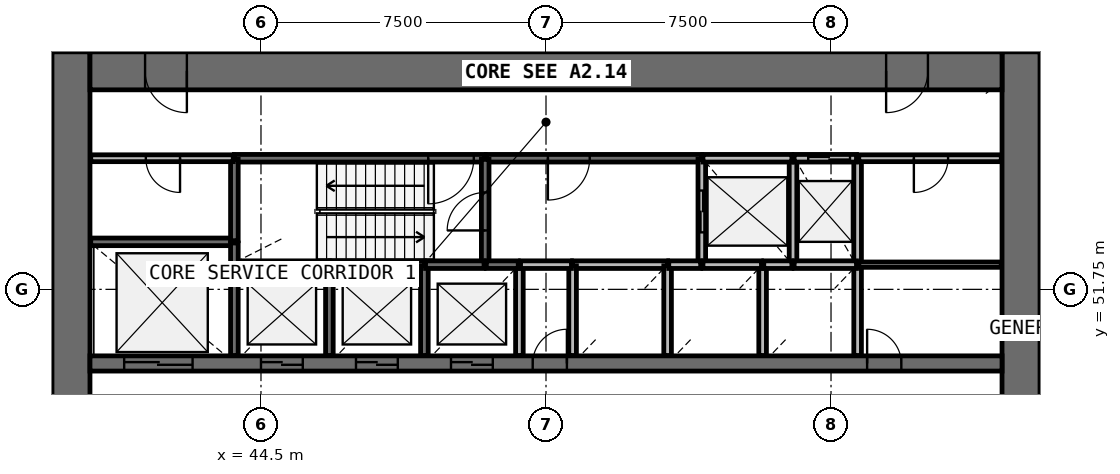
"""IFC4 building model, lengths in metres.
Left out: names, types, materials, properties, quantities, classifications, styles, units other than length and angle.
Written with IfcOpenShell. Run it as: python <this file> out.ifc"""

import sys

from ifc_helpers import new_model, si_unit, direction, frame, frame_2d, origin, place, context, subcontext, project, spatial, rectangle, extrude, source, transform, mapped, element, fill, save


model = new_model("IFC4")
c1 = context("Model", 3, precision=1e-05, world=origin(), true_north=direction((0.0, 1.0)))
c2 = subcontext(c1, "Body", "Model", "MODEL_VIEW")
j1 = project(units=[si_unit("LENGTHUNIT", "METRE"), si_unit("PLANEANGLEUNIT", "RADIAN")], contexts=[c1])
p1 = place(None, origin())
s1 = spatial("IfcSite", under=j1, at=p1, CompositionType="ELEMENT")
p2 = place(p1, origin())
s2 = spatial("IfcBuilding", under=s1, at=p2, CompositionType="ELEMENT")
p3 = place(p2, frame((0.0, 0.0, 57.8)))
s3 = spatial("IfcBuildingStorey", under=s2, at=p3, CompositionType="ELEMENT", Elevation=57.8)
p4 = place(p3, frame((64.5, 38.0, 0.0), z_axis=(0.0, 0.0, 1.0), x_axis=(0.0, 1.0, 0.0)))
e1 = element("IfcWall", 1, at=p4, inside=s3, PredefinedType="SHEAR", context=c2, shape_type="SweptSolid", body=[
    extrude(rectangle(XDim=20.0, YDim=1.0, at=frame_2d((10.0, 0.0))), origin(), (0.0, 0.0, 1.0), 4.4),
])
p5 = place(p4, frame((9.1, 0.0, 0.0)))
e2 = element("IfcOpeningElement", 2, at=p5, cuts=e1, PredefinedType="OPENING", context=c2, shape_type="SweptSolid", body=[
    extrude(rectangle(XDim=1.8, YDim=2.1, at=frame_2d((0.9, 1.05))), frame((0.0, 0.51, 0.0), z_axis=(0.0, -1.0, 0.0), x_axis=(1.0, 0.0, 0.0)), (0.0, 0.0, 1.0), 1.02),
])
p6 = place(p3, frame((39.5, 58.0, 0.0), z_axis=(0.0, 0.0, 1.0), x_axis=(0.0, -1.0, 0.0)))
e3 = element("IfcWall", 3, at=p6, inside=s3, PredefinedType="SHEAR", context=c2, shape_type="SweptSolid", body=[
    extrude(rectangle(XDim=20.0, YDim=1.0, at=frame_2d((10.0, 0.0))), origin(), (0.0, 0.0, 1.0), 4.4),
])
p7 = place(p6, frame((9.1, 0.0, 0.0)))
e4 = element("IfcOpeningElement", 4, at=p7, cuts=e3, PredefinedType="OPENING", context=c2, shape_type="SweptSolid", body=[
    extrude(rectangle(XDim=1.8, YDim=2.1, at=frame_2d((0.9, 1.05))), frame((0.0, 0.51, 0.0), z_axis=(0.0, -1.0, 0.0), x_axis=(1.0, 0.0, 0.0)), (0.0, 0.0, 1.0), 1.02),
])
p8 = place(p3, frame((64.0, 57.5, 0.0), z_axis=(0.0, 0.0, 1.0), x_axis=(-1.0, 0.0, 0.0)))
e5 = element("IfcWall", 5, at=p8, inside=s3, PredefinedType="SHEAR", context=c2, shape_type="SweptSolid", body=[
    extrude(rectangle(XDim=24.0, YDim=1.0, at=frame_2d((12.0, 0.0))), origin(), (0.0, 0.0, 1.0), 4.4),
])
p9 = place(p8, frame((21.45, 0.0, 0.0)))
e6 = element("IfcOpeningElement", 6, at=p9, cuts=e5, PredefinedType="OPENING", context=c2, shape_type="SweptSolid", body=[
    extrude(rectangle(XDim=1.1, YDim=2.1, at=frame_2d((0.55, 1.05))), frame((0.0, 0.51, 0.0), z_axis=(0.0, -1.0, 0.0), x_axis=(1.0, 0.0, 0.0)), (0.0, 0.0, 1.0), 1.02),
])
p10 = place(p8, frame((1.95, 0.0, 0.0)))
e7 = element("IfcOpeningElement", 7, at=p10, cuts=e5, PredefinedType="OPENING", context=c2, shape_type="SweptSolid", body=[
    extrude(rectangle(XDim=1.1, YDim=2.1, at=frame_2d((0.55, 1.05))), frame((0.0, 0.51, 0.0), z_axis=(0.0, -1.0, 0.0), x_axis=(1.0, 0.0, 0.0)), (0.0, 0.0, 1.0), 1.02),
])
p11 = place(p3, frame((40.0, 49.8, 0.0), z_axis=(0.0, 0.0, 1.0), x_axis=(1.0, 0.0, 0.0)))
e8 = element("IfcWall", 8, at=p11, inside=s3, PredefinedType="SHEAR", context=c2, shape_type="SweptSolid", body=[
    extrude(rectangle(XDim=24.0, YDim=0.4, at=frame_2d((12.0, 0.0))), origin(), (0.0, 0.0, 1.0), 4.4),
])
p12 = place(p11, frame((4.5, 0.0, 0.0)))
e9 = element("IfcOpeningElement", 9, at=p12, cuts=e8, PredefinedType="OPENING", context=c2, shape_type="SweptSolid", body=[
    extrude(rectangle(XDim=1.1, YDim=2.1, at=frame_2d((0.55, 1.05))), frame((0.0, 0.21, 0.0), z_axis=(0.0, -1.0, 0.0), x_axis=(1.0, 0.0, 0.0)), (0.0, 0.0, 1.0), 0.42),
])
p13 = place(p11, frame((7.0, 0.0, 0.0)))
e10 = element("IfcOpeningElement", 10, at=p13, cuts=e8, PredefinedType="OPENING", context=c2, shape_type="SweptSolid", body=[
    extrude(rectangle(XDim=1.1, YDim=2.1, at=frame_2d((0.55, 1.05))), frame((0.0, 0.21, 0.0), z_axis=(0.0, -1.0, 0.0), x_axis=(1.0, 0.0, 0.0)), (0.0, 0.0, 1.0), 0.42),
])
p14 = place(p11, frame((9.5, 0.0, 0.0)))
e11 = element("IfcOpeningElement", 11, at=p14, cuts=e8, PredefinedType="OPENING", context=c2, shape_type="SweptSolid", body=[
    extrude(rectangle(XDim=1.1, YDim=2.1, at=frame_2d((0.55, 1.05))), frame((0.0, 0.21, 0.0), z_axis=(0.0, -1.0, 0.0), x_axis=(1.0, 0.0, 0.0)), (0.0, 0.0, 1.0), 0.42),
])
p15 = place(p11, frame((0.9, 0.0, 0.0)))
e12 = element("IfcOpeningElement", 12, at=p15, cuts=e8, PredefinedType="OPENING", context=c2, shape_type="SweptSolid", body=[
    extrude(rectangle(XDim=1.8, YDim=2.4, at=frame_2d((0.9, 1.2))), frame((0.0, 0.21, 0.0), z_axis=(0.0, -1.0, 0.0), x_axis=(1.0, 0.0, 0.0)), (0.0, 0.0, 1.0), 0.42),
])
p16 = place(p11, frame((20.45, 0.0, 0.0)))
e13 = element("IfcOpeningElement", 13, at=p16, cuts=e8, PredefinedType="OPENING", context=c2, shape_type="SweptSolid", body=[
    extrude(rectangle(XDim=0.9, YDim=2.1, at=frame_2d((0.45, 1.05))), frame((0.0, 0.21, 0.0), z_axis=(0.0, -1.0, 0.0), x_axis=(1.0, 0.0, 0.0)), (0.0, 0.0, 1.0), 0.42),
])
p17 = place(p11, frame((11.65, 0.0, 0.0)))
e14 = element("IfcOpeningElement", 14, at=p17, cuts=e8, PredefinedType="OPENING", context=c2, shape_type="SweptSolid", body=[
    extrude(rectangle(XDim=0.9, YDim=2.1, at=frame_2d((0.45, 1.05))), frame((0.0, 0.21, 0.0), z_axis=(0.0, -1.0, 0.0), x_axis=(1.0, 0.0, 0.0)), (0.0, 0.0, 1.0), 0.42),
])
p18 = place(p3, frame((50.4, 55.2, 0.0), z_axis=(0.0, 0.0, 1.0), x_axis=(-1.0, 0.0, 0.0)))
e15 = element("IfcWall", 15, at=p18, inside=s3, PredefinedType="SOLIDWALL", context=c2, shape_type="SweptSolid", body=[
    extrude(rectangle(XDim=6.6, YDim=0.2, at=frame_2d((3.3, 0.0))), origin(), (0.0, 0.0, 1.0), 3.95),
])
p19 = place(p18, frame((0.3, 0.0, 0.0)))
e16 = element("IfcOpeningElement", 16, at=p19, cuts=e15, PredefinedType="OPENING", context=c2, shape_type="SweptSolid", body=[
    extrude(rectangle(XDim=1.2, YDim=2.1, at=frame_2d((0.6, 1.05))), frame((0.0, 0.11, 0.0), z_axis=(0.0, -1.0, 0.0), x_axis=(1.0, 0.0, 0.0)), (0.0, 0.0, 1.0), 0.22),
])
p20 = place(p3, frame((56.1, 55.2, 0.0), z_axis=(0.0, 0.0, 1.0), x_axis=(-1.0, 0.0, 0.0)))
e17 = element("IfcWall", 17, at=p20, inside=s3, PredefinedType="SOLIDWALL", context=c2, shape_type="SweptSolid", body=[
    extrude(rectangle(XDim=5.67, YDim=0.2, at=frame_2d((2.835, 0.0))), origin(), (0.0, 0.0, 1.0), 3.95),
])
p21 = place(p20, frame((2.95, 0.0, 0.0)))
e18 = element("IfcOpeningElement", 18, at=p21, cuts=e17, PredefinedType="OPENING", context=c2, shape_type="SweptSolid", body=[
    extrude(rectangle(XDim=1.1, YDim=2.1, at=frame_2d((0.55, 1.05))), frame((0.0, 0.11, 0.0), z_axis=(0.0, -1.0, 0.0), x_axis=(1.0, 0.0, 0.0)), (0.0, 0.0, 1.0), 0.22),
])
p22 = place(p3, frame((43.8, 53.0, 0.0), z_axis=(0.0, 0.0, 1.0), x_axis=(-1.0, 0.0, 0.0)))
e19 = element("IfcWall", 19, at=p22, inside=s3, PredefinedType="SOLIDWALL", context=c2, shape_type="SweptSolid", body=[
    extrude(rectangle(XDim=3.78, YDim=0.2, at=frame_2d((1.89, 0.0))), origin(), (0.0, 0.0, 1.0), 3.95),
])
p23 = place(p3, frame((50.4, 52.4, 0.0), z_axis=(0.0, 0.0, 1.0), x_axis=(0.0, 1.0, 0.0)))
e20 = element("IfcWall", 20, at=p23, inside=s3, PredefinedType="SOLIDWALL", context=c2, shape_type="SweptSolid", body=[
    extrude(rectangle(XDim=2.77, YDim=0.2, at=frame_2d((1.385, 0.0))), origin(), (0.0, 0.0, 1.0), 3.95),
])
p24 = place(p23, frame((0.9, 0.0, 0.0)))
e21 = element("IfcOpeningElement", 21, at=p24, cuts=e20, PredefinedType="OPENING", context=c2, shape_type="SweptSolid", body=[
    extrude(rectangle(XDim=1.0, YDim=2.1, at=frame_2d((0.5, 1.05))), frame((0.0, 0.11, 0.0), z_axis=(0.0, -1.0, 0.0), x_axis=(1.0, 0.0, 0.0)), (0.0, 0.0, 1.0), 0.22),
])
p25 = place(p3, frame((56.1, 55.17, 0.0), z_axis=(0.0, 0.0, 1.0), x_axis=(0.0, -1.0, 0.0)))
e22 = element("IfcWall", 22, at=p25, inside=s3, PredefinedType="SOLIDWALL", context=c2, shape_type="SweptSolid", body=[
    extrude(rectangle(XDim=2.77, YDim=0.2, at=frame_2d((1.385, 0.0))), origin(), (0.0, 0.0, 1.0), 3.95),
])
p26 = place(p25, frame((0.82, 0.0, 0.0)))
e23 = element("IfcOpeningElement", 23, at=p26, cuts=e22, PredefinedType="OPENING", context=c2, shape_type="SweptSolid", body=[
    extrude(rectangle(XDim=1.1, YDim=2.1, at=frame_2d((0.55, 1.05))), frame((0.0, 0.11, 0.0), z_axis=(0.0, -1.0, 0.0), x_axis=(1.0, 0.0, 0.0)), (0.0, 0.0, 1.0), 0.22),
])
for number, where, z_axis, x_axis in (
    (24, (58.5, 52.4, 0.0), (0.0, 0.0, 1.0), (0.0, 1.0, 0.0)),
    (25, (60.2, 52.4, 0.0), (0.0, 0.0, 1.0), (0.0, 1.0, 0.0)),
):
    element("IfcWall", number, at=place(p3, frame(where, z_axis=z_axis, x_axis=x_axis)), inside=s3, PredefinedType="SOLIDWALL", context=c2, shape_type="SweptSolid", body=[
        extrude(rectangle(XDim=2.8, YDim=0.2, at=frame_2d((1.4, 0.0))), origin(), (0.0, 0.0, 1.0), 3.95),
    ])
p27 = place(p3, frame((46.3, 52.4, 0.0), z_axis=(0.0, 0.0, 1.0), x_axis=(-1.0, 0.0, 0.0)))
e26 = element("IfcWall", 26, at=p27, inside=s3, PredefinedType="SOLIDWALL", context=c2, shape_type="SweptSolid", body=[
    extrude(rectangle(XDim=2.5, YDim=0.2, at=frame_2d((1.25, 0.0))), origin(), (0.0, 0.0, 1.0), 3.95),
])
p28 = place(p3, frame((48.8, 52.4, 0.0), z_axis=(0.0, 0.0, 1.0), x_axis=(-1.0, 0.0, 0.0)))
e27 = element("IfcWall", 27, at=p28, inside=s3, PredefinedType="SOLIDWALL", context=c2, shape_type="SweptSolid", body=[
    extrude(rectangle(XDim=2.47, YDim=0.2, at=frame_2d((1.235, 0.0))), origin(), (0.0, 0.0, 1.0), 3.95),
])
p29 = place(p3, frame((55.2, 52.4, 0.0), z_axis=(0.0, 0.0, 1.0), x_axis=(-1.0, 0.0, 0.0)))
e28 = element("IfcWall", 28, at=p29, inside=s3, PredefinedType="SOLIDWALL", context=c2, shape_type="SweptSolid", body=[
    extrude(rectangle(XDim=2.5, YDim=0.2, at=frame_2d((1.25, 0.0))), origin(), (0.0, 0.0, 1.0), 3.95),
])
p30 = place(p3, frame((58.47, 55.2, 0.0), z_axis=(0.0, 0.0, 1.0), x_axis=(-1.0, 0.0, 0.0)))
e29 = element("IfcWall", 29, at=p30, inside=s3, PredefinedType="SOLIDWALL", context=c2, shape_type="SweptSolid", body=[
    extrude(rectangle(XDim=2.34, YDim=0.2, at=frame_2d((1.17, 0.0))), origin(), (0.0, 0.0, 1.0), 3.95),
])
for number, where, z_axis, x_axis in (
    (30, (43.8, 52.37, 0.0), (0.0, 0.0, 1.0), (0.0, -1.0, 0.0)),
    (31, (46.3, 50.01, 0.0), (0.0, 0.0, 1.0), (0.0, 1.0, 0.0)),
    (32, (48.8, 50.01, 0.0), (0.0, 0.0, 1.0), (0.0, 1.0, 0.0)),
):
    element("IfcWall", number, at=place(p3, frame(where, z_axis=z_axis, x_axis=x_axis)), inside=s3, PredefinedType="SOLIDWALL", context=c2, shape_type="SweptSolid", body=[
        extrude(rectangle(XDim=2.36, YDim=0.2, at=frame_2d((1.18, 0.0))), origin(), (0.0, 0.0, 1.0), 3.95),
    ])
p31 = place(p3, frame((51.3, 50.01, 0.0), z_axis=(0.0, 0.0, 1.0), x_axis=(0.0, 1.0, 0.0)))
e33 = element("IfcWall", 33, at=p31, inside=s3, PredefinedType="SOLIDWALL", context=c2, shape_type="SweptSolid", body=[
    extrude(rectangle(XDim=2.39, YDim=0.2, at=frame_2d((1.195, 0.0))), origin(), (0.0, 0.0, 1.0), 3.95),
])
for number, where, z_axis, x_axis in (
    (34, (52.7, 52.37, 0.0), (0.0, 0.0, 1.0), (0.0, -1.0, 0.0)),
    (35, (55.2, 50.01, 0.0), (0.0, 0.0, 1.0), (0.0, 1.0, 0.0)),
):
    element("IfcWall", number, at=place(p3, frame(where, z_axis=z_axis, x_axis=x_axis)), inside=s3, PredefinedType="SOLIDWALL", context=c2, shape_type="SweptSolid", body=[
        extrude(rectangle(XDim=2.36, YDim=0.2, at=frame_2d((1.18, 0.0))), origin(), (0.0, 0.0, 1.0), 3.95),
    ])
p32 = place(p3, frame((57.7, 50.01, 0.0), z_axis=(0.0, 0.0, 1.0), x_axis=(0.0, 1.0, 0.0)))
e36 = element("IfcWall", 36, at=p32, inside=s3, PredefinedType="SOLIDWALL", context=c2, shape_type="SweptSolid", body=[
    extrude(rectangle(XDim=2.39, YDim=0.2, at=frame_2d((1.195, 0.0))), origin(), (0.0, 0.0, 1.0), 3.95),
])
p33 = place(p3, frame((60.2, 50.01, 0.0), z_axis=(0.0, 0.0, 1.0), x_axis=(0.0, 1.0, 0.0)))
e37 = element("IfcWall", 37, at=p33, inside=s3, PredefinedType="SOLIDWALL", context=c2, shape_type="SweptSolid", body=[
    extrude(rectangle(XDim=2.36, YDim=0.2, at=frame_2d((1.18, 0.0))), origin(), (0.0, 0.0, 1.0), 3.95),
])
p34 = place(p3, frame((43.8, 55.17, 0.0), z_axis=(0.0, 0.0, 1.0), x_axis=(0.0, -1.0, 0.0)))
e38 = element("IfcWall", 38, at=p34, inside=s3, PredefinedType="SOLIDWALL", context=c2, shape_type="SweptSolid", body=[
    extrude(rectangle(XDim=2.14, YDim=0.2, at=frame_2d((1.07, 0.0))), origin(), (0.0, 0.0, 1.0), 3.95),
])
p35 = place(p3, frame((60.17, 52.4, 0.0), z_axis=(0.0, 0.0, 1.0), x_axis=(-1.0, 0.0, 0.0)))
e39 = element("IfcWall", 39, at=p35, inside=s3, PredefinedType="SOLIDWALL", context=c2, shape_type="SweptSolid", body=[
    extrude(rectangle(XDim=1.64, YDim=0.2, at=frame_2d((0.82, 0.0))), origin(), (0.0, 0.0, 1.0), 3.95),
])
p36 = place(p3, frame((60.17, 55.2, 0.0), z_axis=(0.0, 0.0, 1.0), x_axis=(-1.0, 0.0, 0.0)))
e40 = element("IfcWall", 40, at=p36, inside=s3, PredefinedType="SOLIDWALL", context=c2, shape_type="SweptSolid", body=[
    extrude(rectangle(XDim=1.64, YDim=0.2, at=frame_2d((0.82, 0.0))), origin(), (0.0, 0.0, 1.0), 3.95),
])
p37 = place(p36, frame((0.17, 0.0, 0.0)))
e41 = element("IfcOpeningElement", 41, at=p37, cuts=e40, PredefinedType="OPENING", context=c2, shape_type="SweptSolid", body=[
    extrude(rectangle(XDim=1.1, YDim=2.1, at=frame_2d((0.55, 1.05))), frame((0.0, 0.11, 0.0), z_axis=(0.0, -1.0, 0.0), x_axis=(1.0, 0.0, 0.0)), (0.0, 0.0, 1.0), 0.22),
])
for number, where, z_axis, x_axis in (
    (42, (50.37, 52.4, 0.0), (0.0, 0.0, 1.0), (-1.0, 0.0, 0.0)),
    (43, (57.67, 52.4, 0.0), (0.0, 0.0, 1.0), (-1.0, 0.0, 0.0)),
):
    element("IfcWall", number, at=place(p3, frame(where, z_axis=z_axis, x_axis=x_axis)), inside=s3, PredefinedType="SOLIDWALL", context=c2, shape_type="SweptSolid", body=[
        extrude(rectangle(XDim=1.54, YDim=0.2, at=frame_2d((0.77, 0.0))), origin(), (0.0, 0.0, 1.0), 3.95),
    ])
p38 = place(p3, frame((51.33, 52.4, 0.0), z_axis=(0.0, 0.0, 1.0), x_axis=(1.0, 0.0, 0.0)))
e44 = element("IfcWall", 44, at=p38, inside=s3, PredefinedType="SOLIDWALL", context=c2, shape_type="SweptSolid", body=[
    extrude(rectangle(XDim=1.34, YDim=0.2, at=frame_2d((0.67, 0.0))), origin(), (0.0, 0.0, 1.0), 3.95),
])
for number, where, z_axis, x_axis in (
    (45, (51.27, 52.4, 0.0), (0.0, 0.0, 1.0), (-1.0, 0.0, 0.0)),
    (46, (56.07, 52.4, 0.0), (0.0, 0.0, 1.0), (-1.0, 0.0, 0.0)),
):
    element("IfcWall", number, at=place(p3, frame(where, z_axis=z_axis, x_axis=x_axis)), inside=s3, PredefinedType="SOLIDWALL", context=c2, shape_type="SweptSolid", body=[
        extrude(rectangle(XDim=0.84, YDim=0.2, at=frame_2d((0.42, 0.0))), origin(), (0.0, 0.0, 1.0), 3.95),
    ])
p39 = place(p3, frame((58.47, 52.4, 0.0), z_axis=(0.0, 0.0, 1.0), x_axis=(-1.0, 0.0, 0.0)))
e47 = element("IfcWall", 47, at=p39, inside=s3, PredefinedType="SOLIDWALL", context=c2, shape_type="SweptSolid", body=[
    extrude(rectangle(XDim=0.74, YDim=0.2, at=frame_2d((0.37, 0.0))), origin(), (0.0, 0.0, 1.0), 3.95),
])
p40 = place(p3, frame((43.8, 52.43, 0.0), z_axis=(0.0, 0.0, 1.0), x_axis=(0.0, 1.0, 0.0)))
e48 = element("IfcWall", 48, at=p40, inside=s3, PredefinedType="SOLIDWALL", context=c2, shape_type="SweptSolid", body=[
    extrude(rectangle(XDim=0.54, YDim=0.2, at=frame_2d((0.27, 0.0))), origin(), (0.0, 0.0, 1.0), 3.95),
])
p41 = place(p3, frame((43.77, 55.2, 0.0), z_axis=(0.0, 0.0, 1.0), x_axis=(-1.0, 0.0, 0.0)))
e49 = element("IfcWall", 49, at=p41, inside=s3, PredefinedType="PARTITIONING", context=c2, shape_type="SweptSolid", body=[
    extrude(rectangle(XDim=3.75, YDim=0.18, at=frame_2d((1.875, 0.0))), origin(), (0.0, 0.0, 1.0), 3.95),
])
p42 = place(p41, frame((1.4, 0.0, 0.0)))
e50 = element("IfcOpeningElement", 50, at=p42, cuts=e49, PredefinedType="OPENING", context=c2, shape_type="SweptSolid", body=[
    extrude(rectangle(XDim=0.9, YDim=2.1, at=frame_2d((0.45, 1.05))), frame((0.0, 0.1, 0.0), z_axis=(0.0, -1.0, 0.0), x_axis=(1.0, 0.0, 0.0)), (0.0, 0.0, 1.0), 0.2),
])
p43 = place(p3, frame((63.98, 55.2, 0.0), z_axis=(0.0, 0.0, 1.0), x_axis=(-1.0, 0.0, 0.0)))
e51 = element("IfcWall", 51, at=p43, inside=s3, PredefinedType="PARTITIONING", context=c2, shape_type="SweptSolid", body=[
    extrude(rectangle(XDim=3.75, YDim=0.18, at=frame_2d((1.875, 0.0))), origin(), (0.0, 0.0, 1.0), 3.95),
])
p44 = place(p43, frame((1.4, 0.0, 0.0)))
e52 = element("IfcOpeningElement", 52, at=p44, cuts=e51, PredefinedType="OPENING", context=c2, shape_type="SweptSolid", body=[
    extrude(rectangle(XDim=0.9, YDim=2.1, at=frame_2d((0.45, 1.05))), frame((0.0, 0.1, 0.0), z_axis=(0.0, -1.0, 0.0), x_axis=(1.0, 0.0, 0.0)), (0.0, 0.0, 1.0), 0.2),
])
p45 = place(p3, frame((63.98, 52.4, 0.0), z_axis=(0.0, 0.0, 1.0), x_axis=(-1.0, 0.0, 0.0)))
e53 = element("IfcWall", 53, at=p45, inside=s3, PredefinedType="PARTITIONING", context=c2, shape_type="SweptSolid", body=[
    extrude(rectangle(XDim=3.75, YDim=0.14, at=frame_2d((1.875, 0.0))), origin(), (0.0, 0.0, 1.0), 3.05),
])
m1 = source(origin(), c2, "Body", "SweptSolid", [
    extrude(rectangle(XDim=1.1, YDim=2.1, at=frame_2d((0.55, 1.05))), frame((0.0, 0.025, 0.0), z_axis=(0.0, -1.0, 0.0), x_axis=(1.0, 0.0, 0.0)), (0.0, 0.0, 1.0), 0.05),
])
p46 = place(p12, origin())
e54 = element("IfcDoor", 54, at=p46, inside=s3, OperationType="DOUBLE_DOOR_SLIDING", PredefinedType="USERDEFINED", context=c2, shape_type="MappedRepresentation", body=[
    mapped(m1, transform((0.0, 0.0, 0.0), scale=1.0)),
])
fill(e9, e54)
p47 = place(p13, origin())
e55 = element("IfcDoor", 55, at=p47, inside=s3, OperationType="DOUBLE_DOOR_SLIDING", PredefinedType="USERDEFINED", context=c2, shape_type="MappedRepresentation", body=[
    mapped(m1, transform((0.0, 0.0, 0.0), scale=1.0)),
])
fill(e10, e55)
p48 = place(p14, origin())
e56 = element("IfcDoor", 56, at=p48, inside=s3, OperationType="DOUBLE_DOOR_SLIDING", PredefinedType="USERDEFINED", context=c2, shape_type="MappedRepresentation", body=[
    mapped(m1, transform((0.0, 0.0, 0.0), scale=1.0)),
])
fill(e11, e56)
p49 = place(p26, origin())
e57 = element("IfcDoor", 57, at=p49, inside=s3, OperationType="DOUBLE_DOOR_SLIDING", PredefinedType="USERDEFINED", context=c2, shape_type="MappedRepresentation", body=[
    mapped(m1, transform((0.0, 0.0, 0.0), scale=1.0)),
])
fill(e23, e57)
p50 = place(p37, origin())
e58 = element("IfcDoor", 58, at=p50, inside=s3, OperationType="DOUBLE_DOOR_SLIDING", PredefinedType="USERDEFINED", context=c2, shape_type="MappedRepresentation", body=[
    mapped(m1, transform((0.0, 0.0, 0.0), scale=1.0)),
])
fill(e41, e58)
m2 = source(origin(), c2, "Body", "SweptSolid", [
    extrude(rectangle(XDim=1.8, YDim=2.4, at=frame_2d((0.9, 1.2))), frame((0.0, 0.025, 0.0), z_axis=(0.0, -1.0, 0.0), x_axis=(1.0, 0.0, 0.0)), (0.0, 0.0, 1.0), 0.05),
])
p51 = place(p15, origin())
e59 = element("IfcDoor", 59, at=p51, inside=s3, OperationType="DOUBLE_DOOR_SLIDING", PredefinedType="USERDEFINED", context=c2, shape_type="MappedRepresentation", body=[
    mapped(m2, transform((0.0, 0.0, 0.0), scale=1.0)),
])
fill(e12, e59)
m3 = source(origin(), c2, "Body", "SweptSolid", [
    extrude(rectangle(XDim=1.2, YDim=2.1, at=frame_2d((0.6, 1.05))), frame((0.0, 0.025, 0.0), z_axis=(0.0, -1.0, 0.0), x_axis=(1.0, 0.0, 0.0)), (0.0, 0.0, 1.0), 0.05),
])
p52 = place(p19, origin())
e60 = element("IfcDoor", 60, at=p52, inside=s3, OperationType="SINGLE_SWING_RIGHT", PredefinedType="DOOR", context=c2, shape_type="MappedRepresentation", body=[
    mapped(m3, transform((0.0, 0.0, 0.0), scale=1.0)),
])
fill(e16, e60)
m4 = source(origin(), c2, "Body", "SweptSolid", [
    extrude(rectangle(XDim=1.0, YDim=2.1, at=frame_2d((0.5, 1.05))), frame((0.0, 0.025, 0.0), z_axis=(0.0, -1.0, 0.0), x_axis=(1.0, 0.0, 0.0)), (0.0, 0.0, 1.0), 0.05),
])
p53 = place(p24, origin())
e61 = element("IfcDoor", 61, at=p53, inside=s3, OperationType="SINGLE_SWING_LEFT", PredefinedType="DOOR", context=c2, shape_type="MappedRepresentation", body=[
    mapped(m4, transform((0.0, 0.0, 0.0), scale=1.0)),
])
fill(e21, e61)
m5 = source(origin(), c2, "Body", "SweptSolid", [
    extrude(rectangle(XDim=1.1, YDim=2.1, at=frame_2d((0.55, 1.05))), frame((0.0, 0.025, 0.0), z_axis=(0.0, -1.0, 0.0), x_axis=(1.0, 0.0, 0.0)), (0.0, 0.0, 1.0), 0.05),
])
p54 = place(p21, origin())
e62 = element("IfcDoor", 62, at=p54, inside=s3, OperationType="SINGLE_SWING_RIGHT", PredefinedType="DOOR", context=c2, shape_type="MappedRepresentation", body=[
    mapped(m5, transform((0.0, 0.0, 0.0), scale=1.0)),
])
fill(e18, e62)
m6 = source(origin(), c2, "Body", "SweptSolid", [
    extrude(rectangle(XDim=1.1, YDim=2.1, at=frame_2d((0.55, 1.05))), frame((0.0, 0.025, 0.0), z_axis=(0.0, -1.0, 0.0), x_axis=(1.0, 0.0, 0.0)), (0.0, 0.0, 1.0), 0.05),
])
p55 = place(p9, origin())
e63 = element("IfcDoor", 63, at=p55, inside=s3, OperationType="SINGLE_SWING_LEFT", PredefinedType="DOOR", context=c2, shape_type="MappedRepresentation", body=[
    mapped(m6, transform((0.0, 0.0, 0.0), scale=1.0)),
])
fill(e6, e63)
p56 = place(p10, origin())
e64 = element("IfcDoor", 64, at=p56, inside=s3, OperationType="SINGLE_SWING_RIGHT", PredefinedType="DOOR", context=c2, shape_type="MappedRepresentation", body=[
    mapped(m6, transform((0.0, 0.0, 0.0), scale=1.0)),
])
fill(e7, e64)
m7 = source(origin(), c2, "Body", "SweptSolid", [
    extrude(rectangle(XDim=0.9, YDim=2.1, at=frame_2d((0.45, 1.05))), frame((0.0, 0.025, 0.0), z_axis=(0.0, -1.0, 0.0), x_axis=(1.0, 0.0, 0.0)), (0.0, 0.0, 1.0), 0.05),
])
p57 = place(p42, origin())
e65 = element("IfcDoor", 65, at=p57, inside=s3, OperationType="SINGLE_SWING_LEFT", PredefinedType="DOOR", context=c2, shape_type="MappedRepresentation", body=[
    mapped(m7, transform((0.0, 0.0, 0.0), scale=1.0)),
])
fill(e50, e65)
p58 = place(p16, origin())
e66 = element("IfcDoor", 66, at=p58, inside=s3, OperationType="SINGLE_SWING_LEFT", PredefinedType="DOOR", context=c2, shape_type="MappedRepresentation", body=[
    mapped(m7, transform((0.0, 0.0, 0.0), scale=1.0)),
])
fill(e13, e66)
p59 = place(p44, origin())
e67 = element("IfcDoor", 67, at=p59, inside=s3, OperationType="SINGLE_SWING_RIGHT", PredefinedType="DOOR", context=c2, shape_type="MappedRepresentation", body=[
    mapped(m7, transform((0.0, 0.0, 0.0), scale=1.0)),
])
fill(e52, e67)
p60 = place(p17, origin())
e68 = element("IfcDoor", 68, at=p60, inside=s3, OperationType="SINGLE_SWING_RIGHT", PredefinedType="DOOR", context=c2, shape_type="MappedRepresentation", body=[
    mapped(m7, transform((0.0, 0.0, 0.0), scale=1.0)),
])
fill(e14, e68)
save(model, sys.argv[1])
